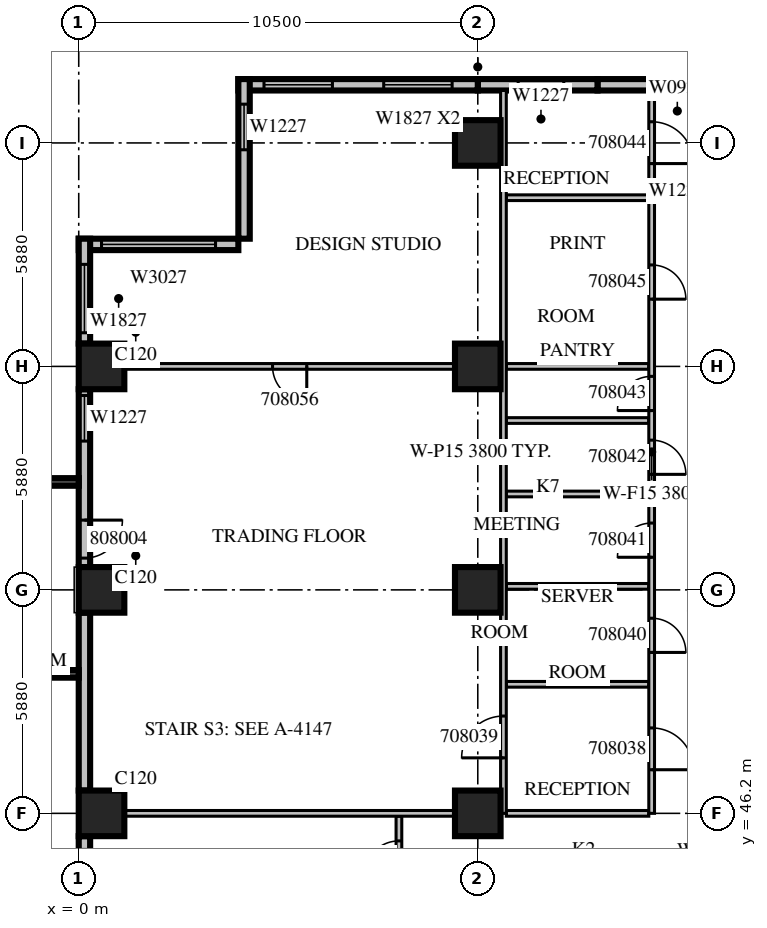
"""IFC4 building model, lengths in metres.
Left out: names, types, materials, properties, quantities, classifications, styles, units other than length and angle.
Written with IfcOpenShell. Run it as: python <this file> out.ifc"""

import sys

from ifc_helpers import new_model, si_unit, direction, frame, frame_2d, origin, origin_2d, place, context, subcontext, project, spatial, rectangle, extrude, source, transform, mapped, element, fill, save


model = new_model("IFC4")
c1 = context("Model", 3, precision=1e-05, world=origin(), true_north=direction((0.0, 1.0)))
c2 = subcontext(c1, "Body", "Model", "MODEL_VIEW")
j1 = project(units=[si_unit("LENGTHUNIT", "METRE"), si_unit("PLANEANGLEUNIT", "RADIAN")], contexts=[c1])
p1 = place(None, origin())
s1 = spatial("IfcSite", under=j1, at=p1, CompositionType="ELEMENT")
p2 = place(p1, origin())
s2 = spatial("IfcBuilding", under=s1, at=p2, CompositionType="ELEMENT")
p3 = place(p2, frame((0.0, 0.0, 44.7)))
s3 = spatial("IfcBuildingStorey", under=s2, at=p3, CompositionType="ELEMENT", Elevation=44.7)
m1 = source(origin(), c2, "Body", "SweptSolid", [
    extrude(rectangle(XDim=1.2, YDim=1.2, at=origin_2d()), origin(), (0.0, 0.0, 1.0), 4.2),
])
for number, where, z_axis, x_axis in (
    (1, (0.6, 46.2, 0.0), (0.0, 0.0, 1.0), (1.0, 0.0, 0.0)),
    (2, (10.5, 46.2, 0.0), (0.0, 0.0, 1.0), (1.0, 0.0, 0.0)),
    (3, (0.6, 52.08, 0.0), (0.0, 0.0, 1.0), (1.0, 0.0, 0.0)),
    (4, (10.5, 52.08, 0.0), (0.0, 0.0, 1.0), (1.0, 0.0, 0.0)),
    (5, (0.6, 57.96, 0.0), (0.0, 0.0, 1.0), (1.0, 0.0, 0.0)),
    (6, (10.5, 57.96, 0.0), (0.0, 0.0, 1.0), (1.0, 0.0, 0.0)),
    (7, (10.5, 63.84, 0.0), (0.0, 0.0, 1.0), (1.0, 0.0, 0.0)),
):
    element("IfcColumn", number, at=place(p3, frame(where, z_axis=z_axis, x_axis=x_axis)), inside=s3, PredefinedType="COLUMN", context=c2, shape_type="MappedRepresentation", body=[
        mapped(m1, transform((0.0, 0.0, 0.0), scale=1.0)),
    ])
m2 = source(origin(), c2, "Body", "SweptSolid", [
    extrude(rectangle(XDim=3.15, YDim=0.3, at=frame_2d((1.575, 0.0))), origin(), (0.0, 0.0, 1.0), 3.8),
])
p4 = place(p3, frame((16.8, 65.37, 0.0), z_axis=(0.0, 0.0, 1.0), x_axis=(-1.0, 0.0, 0.0)))
e8 = element("IfcWall", 8, at=p4, inside=s3, PredefinedType="STANDARD", context=c2, shape_type="MappedRepresentation", body=[
    mapped(m2, transform((0.0, 0.0, 0.0), scale=1.0)),
])
p5 = place(p3, frame((13.65, 65.37, 0.0), z_axis=(0.0, 0.0, 1.0), x_axis=(-1.0, 0.0, 0.0)))
e9 = element("IfcWall", 9, at=p5, inside=s3, PredefinedType="STANDARD", context=c2, shape_type="MappedRepresentation", body=[
    mapped(m2, transform((0.0, 0.0, 0.0), scale=1.0)),
])
m3 = source(origin(), c2, "Body", "SweptSolid", [
    extrude(rectangle(XDim=1.2, YDim=2.7, at=frame_2d((0.6, 1.35))), frame((0.0, 0.16, 0.0), z_axis=(0.0, -1.0, 0.0), x_axis=(1.0, 0.0, 0.0)), (0.0, 0.0, 1.0), 0.32),
])
p6 = place(p5, frame((0.887, 0.0, 0.6)))
e10 = element("IfcOpeningElement", 10, at=p6, cuts=e9, PredefinedType="OPENING", context=c2, shape_type="MappedRepresentation", body=[
    mapped(m3, transform((0.0, 0.0, 0.0), scale=1.0)),
])
m4 = source(origin(), c2, "Body", "SweptSolid", [
    extrude(rectangle(XDim=6.3, YDim=0.3, at=frame_2d((3.15, 0.0))), origin(), (0.0, 0.0, 1.0), 3.8),
])
p7 = place(p3, frame((10.5, 65.37, 0.0), z_axis=(0.0, 0.0, 1.0), x_axis=(-1.0, 0.0, 0.0)))
e11 = element("IfcWall", 11, at=p7, inside=s3, PredefinedType="STANDARD", context=c2, shape_type="MappedRepresentation", body=[
    mapped(m4, transform((0.0, 0.0, 0.0), scale=1.0)),
])
m5 = source(origin(), c2, "Body", "SweptSolid", [
    extrude(rectangle(XDim=1.8, YDim=2.7, at=frame_2d((0.9, 1.35))), frame((0.0, 0.16, 0.0), z_axis=(0.0, -1.0, 0.0), x_axis=(1.0, 0.0, 0.0)), (0.0, 0.0, 1.0), 0.32),
])
p8 = place(p7, frame((0.675, 0.0, 0.6)))
e12 = element("IfcOpeningElement", 12, at=p8, cuts=e11, PredefinedType="OPENING", context=c2, shape_type="MappedRepresentation", body=[
    mapped(m5, transform((0.0, 0.0, 0.0), scale=1.0)),
])
p9 = place(p7, frame((3.825, 0.0, 0.6)))
e13 = element("IfcOpeningElement", 13, at=p9, cuts=e11, PredefinedType="OPENING", context=c2, shape_type="MappedRepresentation", body=[
    mapped(m5, transform((0.0, 0.0, 0.0), scale=1.0)),
])
m6 = source(origin(), c2, "Body", "SweptSolid", [
    extrude(rectangle(XDim=4.2, YDim=0.3, at=frame_2d((2.1, 0.0))), origin(), (0.0, 0.0, 1.0), 3.8),
])
p10 = place(p3, frame((4.35, 65.52, 0.0), z_axis=(0.0, 0.0, 1.0), x_axis=(0.0, -1.0, 0.0)))
e14 = element("IfcWall", 14, at=p10, inside=s3, PredefinedType="STANDARD", context=c2, shape_type="MappedRepresentation", body=[
    mapped(m6, transform((0.0, 0.0, 0.0), scale=1.0)),
])
p11 = place(p10, frame((0.66, 0.0, 0.6)))
e15 = element("IfcOpeningElement", 15, at=p11, cuts=e14, PredefinedType="OPENING", context=c2, shape_type="MappedRepresentation", body=[
    mapped(m3, transform((0.0, 0.0, 0.0), scale=1.0)),
])
p12 = place(p3, frame((4.2, 61.17, 0.0), z_axis=(0.0, 0.0, 1.0), x_axis=(-1.0, 0.0, 0.0)))
e16 = element("IfcWall", 16, at=p12, inside=s3, PredefinedType="STANDARD", context=c2, shape_type="MappedRepresentation", body=[
    mapped(m6, transform((0.0, 0.0, 0.0), scale=1.0)),
])
m7 = source(origin(), c2, "Body", "SweptSolid", [
    extrude(rectangle(XDim=3.0, YDim=2.7, at=frame_2d((1.5, 1.35))), frame((0.0, 0.16, 0.0), z_axis=(0.0, -1.0, 0.0), x_axis=(1.0, 0.0, 0.0)), (0.0, 0.0, 1.0), 0.32),
])
p13 = place(p12, frame((0.6, 0.0, 0.6)))
e17 = element("IfcOpeningElement", 17, at=p13, cuts=e16, PredefinedType="OPENING", context=c2, shape_type="MappedRepresentation", body=[
    mapped(m7, transform((0.0, 0.0, 0.0), scale=1.0)),
])
m8 = source(origin(), c2, "Body", "SweptSolid", [
    extrude(rectangle(XDim=2.76, YDim=0.3, at=frame_2d((1.38, 0.0))), origin(), (0.0, 0.0, 1.0), 3.8),
])
p14 = place(p3, frame((0.15, 61.32, 0.0), z_axis=(0.0, 0.0, 1.0), x_axis=(0.0, -1.0, 0.0)))
e18 = element("IfcWall", 18, at=p14, inside=s3, PredefinedType="STANDARD", context=c2, shape_type="MappedRepresentation", body=[
    mapped(m8, transform((0.0, 0.0, 0.0), scale=1.0)),
])
p15 = place(p14, frame((0.675, 0.0, 0.6)))
e19 = element("IfcOpeningElement", 19, at=p15, cuts=e18, PredefinedType="OPENING", context=c2, shape_type="MappedRepresentation", body=[
    mapped(m5, transform((0.0, 0.0, 0.0), scale=1.0)),
])
m9 = source(origin(), c2, "Body", "SweptSolid", [
    extrude(rectangle(XDim=4.68, YDim=0.3, at=frame_2d((2.34, 0.0))), origin(), (0.0, 0.0, 1.0), 3.8),
])
p16 = place(p3, frame((0.15, 57.36, 0.0), z_axis=(0.0, 0.0, 1.0), x_axis=(0.0, -1.0, 0.0)))
e20 = element("IfcWall", 20, at=p16, inside=s3, PredefinedType="STANDARD", context=c2, shape_type="MappedRepresentation", body=[
    mapped(m9, transform((0.0, 0.0, 0.0), scale=1.0)),
])
p17 = place(p16, frame((0.165, 0.0, 0.6)))
e21 = element("IfcOpeningElement", 21, at=p17, cuts=e20, PredefinedType="OPENING", context=c2, shape_type="MappedRepresentation", body=[
    mapped(m3, transform((0.0, 0.0, 0.0), scale=1.0)),
])
m10 = source(origin(), c2, "Body", "SweptSolid", [
    extrude(rectangle(XDim=1.0, YDim=2.1, at=frame_2d((0.5, 1.05))), frame((0.0, 0.16, 0.0), z_axis=(0.0, -1.0, 0.0), x_axis=(1.0, 0.0, 0.0)), (0.0, 0.0, 1.0), 0.32),
])
p18 = place(p16, frame((3.444, 0.0, 0.0)))
e22 = element("IfcOpeningElement", 22, at=p18, cuts=e20, PredefinedType="OPENING", context=c2, shape_type="MappedRepresentation", body=[
    mapped(m10, transform((0.0, 0.0, 0.0), scale=1.0)),
])
p19 = place(p3, frame((0.15, 51.48, 0.0), z_axis=(0.0, 0.0, 1.0), x_axis=(0.0, -1.0, 0.0)))
e23 = element("IfcWall", 23, at=p19, inside=s3, PredefinedType="STANDARD", context=c2, shape_type="MappedRepresentation", body=[
    mapped(m9, transform((0.0, 0.0, 0.0), scale=1.0)),
])
m11 = source(origin(), c2, "Body", "SweptSolid", [
    extrude(rectangle(XDim=1.6, YDim=0.3, at=frame_2d((0.8, 0.0))), origin(), (0.0, 0.0, 1.0), 3.8),
])
p20 = place(p3, frame((0.15, 45.6, 0.0), z_axis=(0.0, 0.0, 1.0), x_axis=(0.0, -1.0, 0.0)))
e24 = element("IfcWall", 24, at=p20, inside=s3, PredefinedType="STANDARD", context=c2, shape_type="MappedRepresentation", body=[
    mapped(m11, transform((0.0, 0.0, 0.0), scale=1.0)),
])
m12 = source(origin(), c2, "Body", "SweptSolid", [
    extrude(rectangle(XDim=0.9, YDim=2.7, at=frame_2d((0.45, 1.35))), frame((0.0, 0.16, 0.0), z_axis=(0.0, -1.0, 0.0), x_axis=(1.0, 0.0, 0.0)), (0.0, 0.0, 1.0), 0.32),
])
p21 = place(p20, frame((0.35, 0.0, 0.6)))
e25 = element("IfcOpeningElement", 25, at=p21, cuts=e24, PredefinedType="OPENING", context=c2, shape_type="MappedRepresentation", body=[
    mapped(m12, transform((0.0, 0.0, 0.0), scale=1.0)),
])
m13 = source(origin(), c2, "Body", "SweptSolid", [
    extrude(rectangle(XDim=3.9, YDim=0.2, at=frame_2d((1.95, 0.0))), origin(), (0.0, 0.0, 1.0), 3.79),
])
p22 = place(p3, frame((0.0, 54.92, 0.0), z_axis=(0.0, 0.0, 1.0), x_axis=(-1.0, 0.0, 0.0)))
e26 = element("IfcWall", 26, at=p22, inside=s3, PredefinedType="SOLIDWALL", context=c2, shape_type="MappedRepresentation", body=[
    mapped(m13, transform((0.0, 0.0, 0.0), scale=1.0)),
])
m14 = source(origin(), c2, "Body", "SweptSolid", [
    extrude(rectangle(XDim=2.4, YDim=2.7, at=frame_2d((1.2, 1.35))), frame((0.0, 0.11, 0.0), z_axis=(0.0, -1.0, 0.0), x_axis=(1.0, 0.0, 0.0)), (0.0, 0.0, 1.0), 0.22),
])
p23 = place(p22, frame((0.75, 0.0, 0.6)))
e27 = element("IfcOpeningElement", 27, at=p23, cuts=e26, PredefinedType="OPENING", context=c2, shape_type="MappedRepresentation", body=[
    mapped(m14, transform((0.0, 0.0, 0.0), scale=1.0)),
])
p24 = place(p3, frame((0.0, 49.87, 0.0), z_axis=(0.0, 0.0, 1.0), x_axis=(-1.0, 0.0, 0.0)))
e28 = element("IfcWall", 28, at=p24, inside=s3, PredefinedType="SOLIDWALL", context=c2, shape_type="MappedRepresentation", body=[
    mapped(m13, transform((0.0, 0.0, 0.0), scale=1.0)),
])
p25 = place(p24, frame((0.75, 0.0, 0.6)))
e29 = element("IfcOpeningElement", 29, at=p25, cuts=e28, PredefinedType="OPENING", context=c2, shape_type="MappedRepresentation", body=[
    mapped(m14, transform((0.0, 0.0, 0.0), scale=1.0)),
])
m15 = source(origin(), c2, "Body", "SweptSolid", [
    extrude(rectangle(XDim=2.2, YDim=0.15, at=frame_2d((1.1, 0.0))), origin(), (0.0, 0.0, 1.0), 3.8),
])
p26 = place(p3, frame((8.425, 43.925, 0.0), z_axis=(0.0, 0.0, 1.0), x_axis=(0.0, 1.0, 0.0)))
e30 = element("IfcWall", 30, at=p26, inside=s3, PredefinedType="PARTITIONING", context=c2, shape_type="MappedRepresentation", body=[
    mapped(m15, transform((0.0, 0.0, 0.0), scale=1.0)),
])
m16 = source(origin(), c2, "Body", "SweptSolid", [
    extrude(rectangle(XDim=0.9, YDim=2.1, at=frame_2d((0.45, 1.05))), frame((0.0, 0.085, 0.0), z_axis=(0.0, -1.0, 0.0), x_axis=(1.0, 0.0, 0.0)), (0.0, 0.0, 1.0), 0.17),
])
p27 = place(p26, frame((0.65, 0.0, 0.0)))
e31 = element("IfcOpeningElement", 31, at=p27, cuts=e30, PredefinedType="OPENING", context=c2, shape_type="MappedRepresentation", body=[
    mapped(m16, transform((0.0, 0.0, 0.0), scale=1.0)),
])
m17 = source(origin(), c2, "Body", "SweptSolid", [
    extrude(rectangle(XDim=3.75, YDim=0.15, at=frame_2d((1.875, 0.0))), origin(), (0.0, 0.0, 1.0), 3.8),
])
for number, where, z_axis, x_axis in (
    (32, (15.0, 49.596, 0.0), (0.0, 0.0, 1.0), (-1.0, 0.0, 0.0)),
    (33, (15.0, 52.173, 0.0), (0.0, 0.0, 1.0), (-1.0, 0.0, 0.0)),
    (34, (15.0, 54.603, 0.0), (0.0, 0.0, 1.0), (-1.0, 0.0, 0.0)),
    (35, (15.0, 56.536, 0.0), (0.0, 0.0, 1.0), (-1.0, 0.0, 0.0)),
    (36, (15.0, 62.399, 0.0), (0.0, 0.0, 1.0), (-1.0, 0.0, 0.0)),
):
    element("IfcWall", number, at=place(p3, frame(where, z_axis=z_axis, x_axis=x_axis)), inside=s3, PredefinedType="PARTITIONING", context=c2, shape_type="MappedRepresentation", body=[
        mapped(m17, transform((0.0, 0.0, 0.0), scale=1.0)),
    ])
m18 = source(origin(), c2, "Body", "SweptSolid", [
    extrude(rectangle(XDim=8.702, YDim=0.15, at=frame_2d((4.351, 0.0))), origin(), (0.0, 0.0, 1.0), 3.8),
])
p28 = place(p3, frame((9.901, 46.2, 0.0), z_axis=(0.0, 0.0, 1.0), x_axis=(-1.0, 0.0, 0.0)))
e37 = element("IfcWall", 37, at=p28, inside=s3, PredefinedType="PARTITIONING", context=c2, shape_type="MappedRepresentation", body=[
    mapped(m18, transform((0.0, 0.0, 0.0), scale=1.0)),
])
p29 = place(p3, frame((15.0, 46.2, 0.0), z_axis=(0.0, 0.0, 1.0), x_axis=(-1.0, 0.0, 0.0)))
e38 = element("IfcWall", 38, at=p29, inside=s3, PredefinedType="PARTITIONING", context=c2, shape_type="MappedRepresentation", body=[
    mapped(m17, transform((0.0, 0.0, 0.0), scale=1.0)),
])
p30 = place(p3, frame((9.901, 57.96, 0.0), z_axis=(0.0, 0.0, 1.0), x_axis=(-1.0, 0.0, 0.0)))
e39 = element("IfcWall", 39, at=p30, inside=s3, PredefinedType="PARTITIONING", context=c2, shape_type="MappedRepresentation", body=[
    mapped(m18, transform((0.0, 0.0, 0.0), scale=1.0)),
])
p31 = place(p30, frame((3.901, 0.0, 0.0)))
e40 = element("IfcOpeningElement", 40, at=p31, cuts=e39, PredefinedType="OPENING", context=c2, shape_type="MappedRepresentation", body=[
    mapped(m16, transform((0.0, 0.0, 0.0), scale=1.0)),
])
p32 = place(p3, frame((15.0, 57.96, 0.0), z_axis=(0.0, 0.0, 1.0), x_axis=(-1.0, 0.0, 0.0)))
e41 = element("IfcWall", 41, at=p32, inside=s3, PredefinedType="PARTITIONING", context=c2, shape_type="MappedRepresentation", body=[
    mapped(m17, transform((0.0, 0.0, 0.0), scale=1.0)),
])
p33 = place(p3, frame((11.175, 46.2, 0.0), z_axis=(0.0, 0.0, 1.0), x_axis=(0.0, 1.0, 0.0)))
e42 = element("IfcWall", 42, at=p33, inside=s3, PredefinedType="PARTITIONING", context=c2, shape_type="SweptSolid", body=[
    extrude(rectangle(XDim=19.02, YDim=0.15, at=frame_2d((9.51, 0.0))), origin(), (0.0, 0.0, 1.0), 3.8),
])
m19 = source(origin(), c2, "Body", "SweptSolid", [
    extrude(rectangle(XDim=1.1, YDim=2.1, at=frame_2d((0.55, 1.05))), frame((0.0, 0.085, 0.0), z_axis=(0.0, -1.0, 0.0), x_axis=(1.0, 0.0, 0.0)), (0.0, 0.0, 1.0), 0.17),
])
p34 = place(p33, frame((1.46, 0.0, 0.0)))
e43 = element("IfcOpeningElement", 43, at=p34, cuts=e42, PredefinedType="OPENING", context=c2, shape_type="MappedRepresentation", body=[
    mapped(m19, transform((0.0, 0.0, 0.0), scale=1.0)),
])
m20 = source(origin(), c2, "Body", "SweptSolid", [
    extrude(rectangle(XDim=19.02, YDim=0.15, at=frame_2d((9.51, 0.0))), origin(), (0.0, 0.0, 1.0), 3.8),
])
p35 = place(p3, frame((15.075, 46.2, 0.0), z_axis=(0.0, 0.0, 1.0), x_axis=(0.0, 1.0, 0.0)))
e44 = element("IfcWall", 44, at=p35, inside=s3, PredefinedType="PARTITIONING", context=c2, shape_type="MappedRepresentation", body=[
    mapped(m20, transform((0.0, 0.0, 0.0), scale=1.0)),
])
p36 = place(p35, frame((1.148, 0.0, 0.0)))
e45 = element("IfcOpeningElement", 45, at=p36, cuts=e44, PredefinedType="OPENING", context=c2, shape_type="MappedRepresentation", body=[
    mapped(m19, transform((0.0, 0.0, 0.0), scale=1.0)),
])
p37 = place(p35, frame((4.234, 0.0, 0.0)))
e46 = element("IfcOpeningElement", 46, at=p37, cuts=e44, PredefinedType="OPENING", context=c2, shape_type="MappedRepresentation", body=[
    mapped(m16, transform((0.0, 0.0, 0.0), scale=1.0)),
])
p38 = place(p35, frame((6.738, 0.0, 0.0)))
e47 = element("IfcOpeningElement", 47, at=p38, cuts=e44, PredefinedType="OPENING", context=c2, shape_type="MappedRepresentation", body=[
    mapped(m16, transform((0.0, 0.0, 0.0), scale=1.0)),
])
p39 = place(p35, frame((8.92, 0.0, 0.0)))
e48 = element("IfcOpeningElement", 48, at=p39, cuts=e44, PredefinedType="OPENING", context=c2, shape_type="MappedRepresentation", body=[
    mapped(m16, transform((0.0, 0.0, 0.0), scale=1.0)),
])
p40 = place(p35, frame((10.598, 0.0, 0.0)))
e49 = element("IfcOpeningElement", 49, at=p40, cuts=e44, PredefinedType="OPENING", context=c2, shape_type="MappedRepresentation", body=[
    mapped(m16, transform((0.0, 0.0, 0.0), scale=1.0)),
])
p41 = place(p35, frame((17.097, 0.0, 0.0)))
e50 = element("IfcOpeningElement", 50, at=p41, cuts=e44, PredefinedType="OPENING", context=c2, shape_type="MappedRepresentation", body=[
    mapped(m19, transform((0.0, 0.0, 0.0), scale=1.0)),
])
p42 = place(p35, frame((13.529, 0.0, 0.0)))
e51 = element("IfcOpeningElement", 51, at=p42, cuts=e44, PredefinedType="OPENING", context=c2, shape_type="MappedRepresentation", body=[
    mapped(m16, transform((0.0, 0.0, 0.0), scale=1.0)),
])
m21 = source(origin(), c2, "Body", "SweptSolid", [
    extrude(rectangle(XDim=1.2, YDim=2.7, at=frame_2d((0.6, 1.35))), frame((0.0, 0.03, 0.0), z_axis=(0.0, -1.0, 0.0), x_axis=(1.0, 0.0, 0.0)), (0.0, 0.0, 1.0), 0.06),
])
p43 = place(p6, origin())
e52 = element("IfcWindow", 52, at=p43, inside=s3, PartitioningType="SINGLE_PANEL", PredefinedType="WINDOW", context=c2, shape_type="MappedRepresentation", body=[
    mapped(m21, transform((0.0, 0.0, 0.0), scale=1.0)),
])
fill(e10, e52)
m22 = source(origin(), c2, "Body", "SweptSolid", [
    extrude(rectangle(XDim=1.8, YDim=2.7, at=frame_2d((0.9, 1.35))), frame((0.0, 0.03, 0.0), z_axis=(0.0, -1.0, 0.0), x_axis=(1.0, 0.0, 0.0)), (0.0, 0.0, 1.0), 0.06),
])
p44 = place(p8, origin())
e53 = element("IfcWindow", 53, at=p44, inside=s3, PartitioningType="SINGLE_PANEL", PredefinedType="WINDOW", context=c2, shape_type="MappedRepresentation", body=[
    mapped(m22, transform((0.0, 0.0, 0.0), scale=1.0)),
])
fill(e12, e53)
p45 = place(p9, origin())
e54 = element("IfcWindow", 54, at=p45, inside=s3, PartitioningType="SINGLE_PANEL", PredefinedType="WINDOW", context=c2, shape_type="MappedRepresentation", body=[
    mapped(m22, transform((0.0, 0.0, 0.0), scale=1.0)),
])
fill(e13, e54)
p46 = place(p11, origin())
e55 = element("IfcWindow", 55, at=p46, inside=s3, PartitioningType="SINGLE_PANEL", PredefinedType="WINDOW", context=c2, shape_type="MappedRepresentation", body=[
    mapped(m21, transform((0.0, 0.0, 0.0), scale=1.0)),
])
fill(e15, e55)
m23 = source(origin(), c2, "Body", "SweptSolid", [
    extrude(rectangle(XDim=3.0, YDim=2.7, at=frame_2d((1.5, 1.35))), frame((0.0, 0.03, 0.0), z_axis=(0.0, -1.0, 0.0), x_axis=(1.0, 0.0, 0.0)), (0.0, 0.0, 1.0), 0.06),
])
p47 = place(p13, origin())
e56 = element("IfcWindow", 56, at=p47, inside=s3, PartitioningType="SINGLE_PANEL", PredefinedType="WINDOW", context=c2, shape_type="MappedRepresentation", body=[
    mapped(m23, transform((0.0, 0.0, 0.0), scale=1.0)),
])
fill(e17, e56)
p48 = place(p15, origin())
e57 = element("IfcWindow", 57, at=p48, inside=s3, PartitioningType="SINGLE_PANEL", PredefinedType="WINDOW", context=c2, shape_type="MappedRepresentation", body=[
    mapped(m22, transform((0.0, 0.0, 0.0), scale=1.0)),
])
fill(e19, e57)
p49 = place(p17, origin())
e58 = element("IfcWindow", 58, at=p49, inside=s3, PartitioningType="SINGLE_PANEL", PredefinedType="WINDOW", context=c2, shape_type="MappedRepresentation", body=[
    mapped(m21, transform((0.0, 0.0, 0.0), scale=1.0)),
])
fill(e21, e58)
m24 = source(origin(), c2, "Body", "SweptSolid", [
    extrude(rectangle(XDim=0.9, YDim=2.1, at=frame_2d((0.45, 1.05))), frame((0.0, 0.025, 0.0), z_axis=(0.0, -1.0, 0.0), x_axis=(1.0, 0.0, 0.0)), (0.0, 0.0, 1.0), 0.05),
])
p50 = place(p27, origin())
e59 = element("IfcDoor", 59, at=p50, inside=s3, OperationType="SINGLE_SWING_LEFT", PredefinedType="DOOR", context=c2, shape_type="MappedRepresentation", body=[
    mapped(m24, transform((0.0, 0.0, 0.0), scale=1.0)),
])
fill(e31, e59)
m25 = source(origin(), c2, "Body", "SweptSolid", [
    extrude(rectangle(XDim=1.1, YDim=2.1, at=frame_2d((0.55, 1.05))), frame((0.0, 0.025, 0.0), z_axis=(0.0, -1.0, 0.0), x_axis=(1.0, 0.0, 0.0)), (0.0, 0.0, 1.0), 0.05),
])
p51 = place(p36, origin())
e60 = element("IfcDoor", 60, at=p51, inside=s3, OperationType="SINGLE_SWING_RIGHT", PredefinedType="DOOR", context=c2, shape_type="MappedRepresentation", body=[
    mapped(m25, transform((0.0, 0.0, 0.0), scale=1.0)),
])
fill(e45, e60)
p52 = place(p34, origin())
e61 = element("IfcDoor", 61, at=p52, inside=s3, OperationType="SINGLE_SWING_LEFT", PredefinedType="DOOR", context=c2, shape_type="MappedRepresentation", body=[
    mapped(m25, transform((0.0, 0.0, 0.0), scale=1.0)),
])
fill(e43, e61)
p53 = place(p37, origin())
e62 = element("IfcDoor", 62, at=p53, inside=s3, OperationType="SINGLE_SWING_RIGHT", PredefinedType="DOOR", context=c2, shape_type="MappedRepresentation", body=[
    mapped(m24, transform((0.0, 0.0, 0.0), scale=1.0)),
])
fill(e46, e62)
p54 = place(p38, origin())
e63 = element("IfcDoor", 63, at=p54, inside=s3, OperationType="SINGLE_SWING_LEFT", PredefinedType="DOOR", context=c2, shape_type="MappedRepresentation", body=[
    mapped(m24, transform((0.0, 0.0, 0.0), scale=1.0)),
])
fill(e47, e63)
p55 = place(p39, origin())
e64 = element("IfcDoor", 64, at=p55, inside=s3, OperationType="SINGLE_SWING_RIGHT", PredefinedType="DOOR", context=c2, shape_type="MappedRepresentation", body=[
    mapped(m24, transform((0.0, 0.0, 0.0), scale=1.0)),
])
fill(e48, e64)
p56 = place(p40, origin())
e65 = element("IfcDoor", 65, at=p56, inside=s3, OperationType="SINGLE_SWING_LEFT", PredefinedType="DOOR", context=c2, shape_type="MappedRepresentation", body=[
    mapped(m24, transform((0.0, 0.0, 0.0), scale=1.0)),
])
fill(e49, e65)
p57 = place(p41, origin())
e66 = element("IfcDoor", 66, at=p57, inside=s3, OperationType="SINGLE_SWING_RIGHT", PredefinedType="DOOR", context=c2, shape_type="MappedRepresentation", body=[
    mapped(m25, transform((0.0, 0.0, 0.0), scale=1.0)),
])
fill(e50, e66)
p58 = place(p42, origin())
e67 = element("IfcDoor", 67, at=p58, inside=s3, OperationType="SINGLE_SWING_RIGHT", PredefinedType="DOOR", context=c2, shape_type="MappedRepresentation", body=[
    mapped(m24, transform((0.0, 0.0, 0.0), scale=1.0)),
])
fill(e51, e67)
p59 = place(p31, origin())
e68 = element("IfcDoor", 68, at=p59, inside=s3, OperationType="SINGLE_SWING_LEFT", PredefinedType="DOOR", context=c2, shape_type="MappedRepresentation", body=[
    mapped(m24, transform((0.0, 0.0, 0.0), scale=1.0)),
])
fill(e40, e68)
m26 = source(origin(), c2, "Body", "SweptSolid", [
    extrude(rectangle(XDim=1.0, YDim=2.1, at=frame_2d((0.5, 1.05))), frame((0.0, 0.025, 0.0), z_axis=(0.0, -1.0, 0.0), x_axis=(1.0, 0.0, 0.0)), (0.0, 0.0, 1.0), 0.05),
])
p60 = place(p18, origin())
e69 = element("IfcDoor", 69, at=p60, inside=s3, OperationType="SINGLE_SWING_LEFT", PredefinedType="DOOR", context=c2, shape_type="MappedRepresentation", body=[
    mapped(m26, transform((0.0, 0.0, 0.0), scale=1.0)),
])
fill(e22, e69)
save(model, sys.argv[1])
